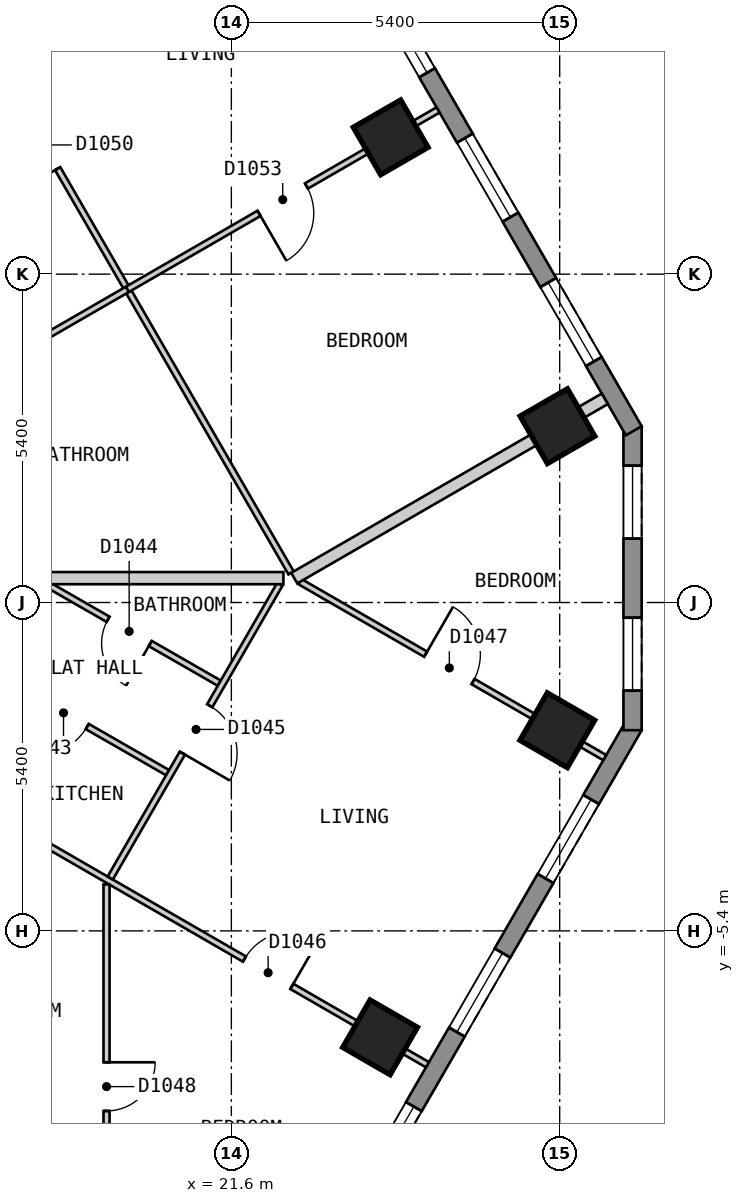
"""IFC4 building model, lengths in metres.
Left out: names, types, materials, properties, quantities, classifications, styles, units other than length and angle.
Written with IfcOpenShell. Run it as: python <this file> out.ifc"""

import sys

from ifc_helpers import new_model, si_unit, direction, frame, frame_2d, origin, origin_2d, place, context, subcontext, project, spatial, polyline, rectangle, outline, extrude, element, fill, save


model = new_model("IFC4")
c1 = context("Model", 3, precision=1e-05, world=origin(), true_north=direction((0.0, 1.0)))
c2 = subcontext(c1, "Body", "Model", "MODEL_VIEW")
j1 = project(units=[si_unit("LENGTHUNIT", "METRE"), si_unit("PLANEANGLEUNIT", "RADIAN")], contexts=[c1])
p1 = place(None, origin())
s1 = spatial("IfcSite", under=j1, at=p1, CompositionType="ELEMENT")
p2 = place(p1, origin())
s2 = spatial("IfcBuilding", under=s1, at=p2, CompositionType="ELEMENT")
p3 = place(p2, frame((0.0, 0.0, 126.6)))
s3 = spatial("IfcBuildingStorey", under=s2, at=p3, CompositionType="ELEMENT", Elevation=126.6)
for number, where, z_axis, x_axis in (
    (1, (24.046, -7.151, 0.0), (0.0, 0.0, 1.0), (0.5, 0.866, 0.0)),
    (2, (26.961, -2.101, 0.0), (0.0, 0.0, 1.0), (0.5, 0.866, 0.0)),
    (3, (26.963, 2.9, 0.0), (0.0, 0.0, 1.0), (-0.5, 0.866, 0.0)),
    (4, (24.22, 7.65, 0.0), (0.0, 0.0, 1.0), (-0.5, 0.866, 0.0)),
):
    element("IfcColumn", number, at=place(p3, frame(where, z_axis=z_axis, x_axis=x_axis)), inside=s3, PredefinedType="COLUMN", context=c2, shape_type="SweptSolid", body=[
        extrude(rectangle(XDim=0.9, YDim=0.9, at=origin_2d()), origin(), (0.0, 0.0, 1.0), 3.0),
    ])
p4 = place(p3, frame((15.862, -23.425, 0.0), z_axis=(0.0, 0.0, 1.0), x_axis=(0.500017503135, 0.866015298109, 0.0)))
e5 = element("IfcWall", 5, at=p4, inside=s3, PredefinedType="SOLIDWALL", context=c2, shape_type="SweptSolid", body=[
    extrude(outline(polyline([(0.0, -0.15), (24.711, -0.15), (24.631, 0.15), (0.08, 0.15), (0.0, -0.15)])), origin(), (0.0, 0.0, 1.0), 2.7),
])
p5 = place(p4, frame((1.4, 0.0, 0.15)))
e6 = element("IfcOpeningElement", 6, at=p5, cuts=e5, PredefinedType="OPENING", context=c2, shape_type="SweptSolid", body=[
    extrude(rectangle(XDim=1.5, YDim=2.1, at=frame_2d((0.75, 1.05))), frame((0.0, 0.16, 0.0), z_axis=(0.0, -1.0, 0.0), x_axis=(1.0, 0.0, 0.0)), (0.0, 0.0, 1.0), 0.32),
])
p6 = place(p4, frame((4.316, 0.0, 0.15)))
e7 = element("IfcOpeningElement", 7, at=p6, cuts=e5, PredefinedType="OPENING", context=c2, shape_type="SweptSolid", body=[
    extrude(rectangle(XDim=1.5, YDim=2.1, at=frame_2d((0.75, 1.05))), frame((0.0, 0.16, 0.0), z_axis=(0.0, -1.0, 0.0), x_axis=(1.0, 0.0, 0.0)), (0.0, 0.0, 1.0), 0.32),
])
p7 = place(p4, frame((7.231, 0.0, 0.15)))
e8 = element("IfcOpeningElement", 8, at=p7, cuts=e5, PredefinedType="OPENING", context=c2, shape_type="SweptSolid", body=[
    extrude(rectangle(XDim=1.5, YDim=2.1, at=frame_2d((0.75, 1.05))), frame((0.0, 0.16, 0.0), z_axis=(0.0, -1.0, 0.0), x_axis=(1.0, 0.0, 0.0)), (0.0, 0.0, 1.0), 0.32),
])
p8 = place(p4, frame((10.147, 0.0, 0.15)))
e9 = element("IfcOpeningElement", 9, at=p8, cuts=e5, PredefinedType="OPENING", context=c2, shape_type="SweptSolid", body=[
    extrude(rectangle(XDim=1.5, YDim=2.1, at=frame_2d((0.75, 1.05))), frame((0.0, 0.16, 0.0), z_axis=(0.0, -1.0, 0.0), x_axis=(1.0, 0.0, 0.0)), (0.0, 0.0, 1.0), 0.32),
])
p9 = place(p4, frame((13.062, 0.0, 0.15)))
e10 = element("IfcOpeningElement", 10, at=p9, cuts=e5, PredefinedType="OPENING", context=c2, shape_type="SweptSolid", body=[
    extrude(rectangle(XDim=1.5, YDim=2.1, at=frame_2d((0.75, 1.05))), frame((0.0, 0.16, 0.0), z_axis=(0.0, -1.0, 0.0), x_axis=(1.0, 0.0, 0.0)), (0.0, 0.0, 1.0), 0.32),
])
p10 = place(p4, frame((15.977, 0.0, 0.15)))
e11 = element("IfcOpeningElement", 11, at=p10, cuts=e5, PredefinedType="OPENING", context=c2, shape_type="SweptSolid", body=[
    extrude(rectangle(XDim=1.5, YDim=2.1, at=frame_2d((0.75, 1.05))), frame((0.0, 0.16, 0.0), z_axis=(0.0, -1.0, 0.0), x_axis=(1.0, 0.0, 0.0)), (0.0, 0.0, 1.0), 0.32),
])
p11 = place(p4, frame((18.893, 0.0, 0.15)))
e12 = element("IfcOpeningElement", 12, at=p11, cuts=e5, PredefinedType="OPENING", context=c2, shape_type="SweptSolid", body=[
    extrude(rectangle(XDim=1.5, YDim=2.1, at=frame_2d((0.75, 1.05))), frame((0.0, 0.16, 0.0), z_axis=(0.0, -1.0, 0.0), x_axis=(1.0, 0.0, 0.0)), (0.0, 0.0, 1.0), 0.32),
])
p12 = place(p4, frame((21.809, 0.0, 0.15)))
e13 = element("IfcOpeningElement", 13, at=p12, cuts=e5, PredefinedType="OPENING", context=c2, shape_type="SweptSolid", body=[
    extrude(rectangle(XDim=1.5, YDim=2.1, at=frame_2d((0.75, 1.05))), frame((0.0, 0.16, 0.0), z_axis=(0.0, -1.0, 0.0), x_axis=(1.0, 0.0, 0.0)), (0.0, 0.0, 1.0), 0.32),
])
p13 = place(p3, frame((28.198, -2.1, 0.0), z_axis=(0.0, 0.0, 1.0), x_axis=(0.0, 1.0, 0.0)))
e14 = element("IfcWall", 14, at=p13, inside=s3, PredefinedType="SOLIDWALL", context=c2, shape_type="SweptSolid", body=[
    extrude(outline(polyline([(0.0, -0.15), (5.0, -0.15), (4.92, 0.15), (0.08, 0.15), (0.0, -0.15)])), origin(), (0.0, 0.0, 1.0), 2.7),
])
p14 = place(p13, frame((0.65, 0.0, 0.15)))
e15 = element("IfcOpeningElement", 15, at=p14, cuts=e14, PredefinedType="OPENING", context=c2, shape_type="SweptSolid", body=[
    extrude(rectangle(XDim=1.2, YDim=2.1, at=frame_2d((0.6, 1.05))), frame((0.0, 0.16, 0.0), z_axis=(0.0, -1.0, 0.0), x_axis=(1.0, 0.0, 0.0)), (0.0, 0.0, 1.0), 0.32),
])
p15 = place(p13, frame((3.15, 0.0, 0.15)))
e16 = element("IfcOpeningElement", 16, at=p15, cuts=e14, PredefinedType="OPENING", context=c2, shape_type="SweptSolid", body=[
    extrude(rectangle(XDim=1.2, YDim=2.1, at=frame_2d((0.6, 1.05))), frame((0.0, 0.16, 0.0), z_axis=(0.0, -1.0, 0.0), x_axis=(1.0, 0.0, 0.0)), (0.0, 0.0, 1.0), 0.32),
])
p16 = place(p3, frame((28.218, 2.825, 0.0), z_axis=(0.0, 0.0, 1.0), x_axis=(-0.500020536353, 0.866013546791, 0.0)))
e17 = element("IfcWall", 17, at=p16, inside=s3, PredefinedType="SOLIDWALL", context=c2, shape_type="SweptSolid", body=[
    extrude(outline(polyline([(0.0, -0.15), (23.325, -0.15), (23.245, 0.15), (0.08, 0.15), (0.0, -0.15)])), origin(), (0.0, 0.0, 1.0), 2.7),
])
p17 = place(p16, frame((1.314, 0.0, 0.15)))
e18 = element("IfcOpeningElement", 18, at=p17, cuts=e17, PredefinedType="OPENING", context=c2, shape_type="SweptSolid", body=[
    extrude(rectangle(XDim=1.5, YDim=2.1, at=frame_2d((0.75, 1.05))), frame((0.0, 0.16, 0.0), z_axis=(0.0, -1.0, 0.0), x_axis=(1.0, 0.0, 0.0)), (0.0, 0.0, 1.0), 0.32),
])
p18 = place(p16, frame((4.056, 0.0, 0.15)))
e19 = element("IfcOpeningElement", 19, at=p18, cuts=e17, PredefinedType="OPENING", context=c2, shape_type="SweptSolid", body=[
    extrude(rectangle(XDim=1.5, YDim=2.1, at=frame_2d((0.75, 1.05))), frame((0.0, 0.16, 0.0), z_axis=(0.0, -1.0, 0.0), x_axis=(1.0, 0.0, 0.0)), (0.0, 0.0, 1.0), 0.32),
])
p19 = place(p16, frame((6.798, 0.0, 0.15)))
e20 = element("IfcOpeningElement", 20, at=p19, cuts=e17, PredefinedType="OPENING", context=c2, shape_type="SweptSolid", body=[
    extrude(rectangle(XDim=1.5, YDim=2.1, at=frame_2d((0.75, 1.05))), frame((0.0, 0.16, 0.0), z_axis=(0.0, -1.0, 0.0), x_axis=(1.0, 0.0, 0.0)), (0.0, 0.0, 1.0), 0.32),
])
p20 = place(p16, frame((9.541, 0.0, 0.15)))
e21 = element("IfcOpeningElement", 21, at=p20, cuts=e17, PredefinedType="OPENING", context=c2, shape_type="SweptSolid", body=[
    extrude(rectangle(XDim=1.5, YDim=2.1, at=frame_2d((0.75, 1.05))), frame((0.0, 0.16, 0.0), z_axis=(0.0, -1.0, 0.0), x_axis=(1.0, 0.0, 0.0)), (0.0, 0.0, 1.0), 0.32),
])
p21 = place(p16, frame((12.284, 0.0, 0.15)))
e22 = element("IfcOpeningElement", 22, at=p21, cuts=e17, PredefinedType="OPENING", context=c2, shape_type="SweptSolid", body=[
    extrude(rectangle(XDim=1.5, YDim=2.1, at=frame_2d((0.75, 1.05))), frame((0.0, 0.16, 0.0), z_axis=(0.0, -1.0, 0.0), x_axis=(1.0, 0.0, 0.0)), (0.0, 0.0, 1.0), 0.32),
])
p22 = place(p16, frame((15.027, 0.0, 0.15)))
e23 = element("IfcOpeningElement", 23, at=p22, cuts=e17, PredefinedType="OPENING", context=c2, shape_type="SweptSolid", body=[
    extrude(rectangle(XDim=1.5, YDim=2.1, at=frame_2d((0.75, 1.05))), frame((0.0, 0.16, 0.0), z_axis=(0.0, -1.0, 0.0), x_axis=(1.0, 0.0, 0.0)), (0.0, 0.0, 1.0), 0.32),
])
p23 = place(p16, frame((17.769, 0.0, 0.15)))
e24 = element("IfcOpeningElement", 24, at=p23, cuts=e17, PredefinedType="OPENING", context=c2, shape_type="SweptSolid", body=[
    extrude(rectangle(XDim=1.5, YDim=2.1, at=frame_2d((0.75, 1.05))), frame((0.0, 0.16, 0.0), z_axis=(0.0, -1.0, 0.0), x_axis=(1.0, 0.0, 0.0)), (0.0, 0.0, 1.0), 0.32),
])
p24 = place(p16, frame((20.511, 0.0, 0.15)))
e25 = element("IfcOpeningElement", 25, at=p24, cuts=e17, PredefinedType="OPENING", context=c2, shape_type="SweptSolid", body=[
    extrude(rectangle(XDim=1.5, YDim=2.1, at=frame_2d((0.75, 1.05))), frame((0.0, 0.16, 0.0), z_axis=(0.0, -1.0, 0.0), x_axis=(1.0, 0.0, 0.0)), (0.0, 0.0, 1.0), 0.32),
])
p25 = place(p3, frame((14.455, 14.563, 0.0), z_axis=(0.0, 0.0, 1.0), x_axis=(0.500009803579, -0.866019743612, 0.0)))
e26 = element("IfcWall", 26, at=p25, inside=s3, PredefinedType="PARTITIONING", context=c2, shape_type="SweptSolid", body=[
    extrude(rectangle(XDim=16.254, YDim=0.1, at=frame_2d((8.127, 0.0))), origin(), (0.0, 0.0, 1.0), 2.7),
])
p26 = place(p25, frame((7.677, 0.0, 0.0)))
e27 = element("IfcOpeningElement", 27, at=p26, cuts=e26, PredefinedType="OPENING", context=c2, shape_type="SweptSolid", body=[
    extrude(rectangle(XDim=0.9, YDim=2.1, at=frame_2d((0.45, 1.05))), frame((0.0, 0.06, 0.0), z_axis=(0.0, -1.0, 0.0), x_axis=(1.0, 0.0, 0.0)), (0.0, 0.0, 1.0), 0.12),
])
p27 = place(p3, frame((16.165, -2.601, 0.0), z_axis=(0.0, 0.0, 1.0), x_axis=(0.866016855193, -0.500014806302, 0.0)))
e28 = element("IfcWall", 28, at=p27, inside=s3, PredefinedType="PARTITIONING", context=c2, shape_type="SweptSolid", body=[
    extrude(rectangle(XDim=10.0, YDim=0.1, at=frame_2d((5.0, 0.0))), origin(), (0.0, 0.0, 1.0), 2.7),
])
p28 = place(p27, frame((6.524, 0.0, 0.0)))
e29 = element("IfcOpeningElement", 29, at=p28, cuts=e28, PredefinedType="OPENING", context=c2, shape_type="SweptSolid", body=[
    extrude(rectangle(XDim=0.9, YDim=2.1, at=frame_2d((0.45, 1.05))), frame((0.0, 0.06, 0.0), z_axis=(0.0, -1.0, 0.0), x_axis=(1.0, 0.0, 0.0)), (0.0, 0.0, 1.0), 0.12),
])
p29 = place(p3, frame((17.171, -0.857, 0.0), z_axis=(0.0, 0.0, 1.0), x_axis=(0.867173455867, -0.49800622229, 0.0)))
e30 = element("IfcWall", 30, at=p29, inside=s3, PredefinedType="PARTITIONING", context=c2, shape_type="SweptSolid", body=[
    extrude(rectangle(XDim=3.898, YDim=0.1, at=frame_2d((1.949, 0.0))), origin(), (0.0, 0.0, 1.0), 2.7),
])
p30 = place(p29, frame((1.474, 0.0, 0.0)))
e31 = element("IfcOpeningElement", 31, at=p30, cuts=e30, PredefinedType="OPENING", context=c2, shape_type="SweptSolid", body=[
    extrude(rectangle(XDim=0.9, YDim=2.1, at=frame_2d((0.45, 1.05))), frame((0.0, 0.06, 0.0), z_axis=(0.0, -1.0, 0.0), x_axis=(1.0, 0.0, 0.0)), (0.0, 0.0, 1.0), 0.12),
])
p31 = place(p3, frame((18.568, 0.301, 0.0), z_axis=(0.0, 0.0, 1.0), x_axis=(0.867155675456, -0.49803718187, 0.0)))
e32 = element("IfcWall", 32, at=p31, inside=s3, PredefinedType="PARTITIONING", context=c2, shape_type="SweptSolid", body=[
    extrude(rectangle(XDim=3.267, YDim=0.1, at=frame_2d((1.633, 0.0))), origin(), (0.0, 0.0, 1.0), 2.7),
])
p32 = place(p31, frame((1.158, 0.0, 0.0)))
e33 = element("IfcOpeningElement", 33, at=p32, cuts=e32, PredefinedType="OPENING", context=c2, shape_type="SweptSolid", body=[
    extrude(rectangle(XDim=0.8, YDim=2.1, at=frame_2d((0.4, 1.05))), frame((0.0, 0.06, 0.0), z_axis=(0.0, -1.0, 0.0), x_axis=(1.0, 0.0, 0.0)), (0.0, 0.0, 1.0), 0.12),
])
p33 = place(p3, frame((22.729, 0.343, 0.0), z_axis=(0.0, 0.0, 1.0), x_axis=(0.865996608848, -0.500049870977, 0.0)))
e34 = element("IfcWall", 34, at=p33, inside=s3, PredefinedType="PARTITIONING", context=c2, shape_type="SweptSolid", body=[
    extrude(rectangle(XDim=5.788, YDim=0.1, at=frame_2d((2.894, 0.0))), origin(), (0.0, 0.0, 1.0), 2.7),
])
p34 = place(p33, frame((2.386, 0.0, 0.0)))
e35 = element("IfcOpeningElement", 35, at=p34, cuts=e34, PredefinedType="OPENING", context=c2, shape_type="SweptSolid", body=[
    extrude(rectangle(XDim=0.9, YDim=2.1, at=frame_2d((0.45, 1.05))), frame((0.0, 0.06, 0.0), z_axis=(0.0, -1.0, 0.0), x_axis=(1.0, 0.0, 0.0)), (0.0, 0.0, 1.0), 0.12),
])
p35 = place(p3, frame((19.608, -4.531, 0.0), z_axis=(0.0, 0.0, 1.0), x_axis=(0.500035555316, 0.86600487494, 0.0)))
e36 = element("IfcWall", 36, at=p35, inside=s3, PredefinedType="PARTITIONING", context=c2, shape_type="SweptSolid", body=[
    extrude(rectangle(XDim=5.58, YDim=0.1, at=frame_2d((2.79, 0.0))), origin(), (0.0, 0.0, 1.0), 2.7),
])
p36 = place(p35, frame((2.372, 0.0, 0.0)))
e37 = element("IfcOpeningElement", 37, at=p36, cuts=e36, PredefinedType="OPENING", context=c2, shape_type="SweptSolid", body=[
    extrude(rectangle(XDim=0.9, YDim=2.1, at=frame_2d((0.45, 1.05))), frame((0.0, 0.06, 0.0), z_axis=(0.0, -1.0, 0.0), x_axis=(1.0, 0.0, 0.0)), (0.0, 0.0, 1.0), 0.12),
])
p37 = place(p3, frame((19.547, -11.171, 0.0), z_axis=(0.0, 0.0, 1.0), x_axis=(0.0, 1.0, 0.0)))
e38 = element("IfcWall", 38, at=p37, inside=s3, PredefinedType="PARTITIONING", context=c2, shape_type="SweptSolid", body=[
    extrude(rectangle(XDim=6.534, YDim=0.1, at=frame_2d((3.267, 0.0))), origin(), (0.0, 0.0, 1.0), 2.7),
])
p38 = place(p37, frame((2.81, 0.0, 0.0)))
e39 = element("IfcOpeningElement", 39, at=p38, cuts=e38, PredefinedType="OPENING", context=c2, shape_type="SweptSolid", body=[
    extrude(rectangle(XDim=0.8, YDim=2.1, at=frame_2d((0.4, 1.05))), frame((0.0, 0.06, 0.0), z_axis=(0.0, -1.0, 0.0), x_axis=(1.0, 0.0, 0.0)), (0.0, 0.0, 1.0), 0.12),
])
p39 = place(p3, frame((16.339, 3.1, 0.0), z_axis=(0.0, 0.0, 1.0), x_axis=(0.866050731258, 0.499956128963, 0.0)))
e40 = element("IfcWall", 40, at=p39, inside=s3, PredefinedType="PARTITIONING", context=c2, shape_type="SweptSolid", body=[
    extrude(rectangle(XDim=4.1, YDim=0.1, at=frame_2d((2.05, 0.0))), origin(), (0.0, 0.0, 1.0), 2.7),
])
p40 = place(p39, frame((1.6, 0.0, 0.0)))
e41 = element("IfcOpeningElement", 41, at=p40, cuts=e40, PredefinedType="OPENING", context=c2, shape_type="SweptSolid", body=[
    extrude(rectangle(XDim=0.8, YDim=2.1, at=frame_2d((0.4, 1.05))), frame((0.0, 0.06, 0.0), z_axis=(0.0, -1.0, 0.0), x_axis=(1.0, 0.0, 0.0)), (0.0, 0.0, 1.0), 0.12),
])
p41 = place(p3, frame((17.782, 0.401, 0.0), z_axis=(0.0, 0.0, 1.0), x_axis=(1.0, 0.0, 0.0)))
e42 = element("IfcWall", 42, at=p41, inside=s3, PredefinedType="PARTITIONING", context=c2, shape_type="SweptSolid", body=[
    extrude(rectangle(XDim=4.674, YDim=0.2, at=frame_2d((2.337, 0.0))), origin(), (0.0, 0.0, 1.0), 2.7),
])
p42 = place(p3, frame((22.634, 0.401, 0.0), z_axis=(0.0, 0.0, 1.0), x_axis=(0.86601325737, 0.500021037617, 0.0)))
e43 = element("IfcWall", 43, at=p42, inside=s3, PredefinedType="PARTITIONING", context=c2, shape_type="SweptSolid", body=[
    extrude(rectangle(XDim=5.898, YDim=0.2, at=frame_2d((2.949, 0.0))), origin(), (0.0, 0.0, 1.0), 2.7),
])
p43 = place(p3, frame((19.89, 5.15, 0.0), z_axis=(0.0, 0.0, 1.0), x_axis=(0.865993310977, 0.500055582255, 0.0)))
e44 = element("IfcWall", 44, at=p43, inside=s3, PredefinedType="PARTITIONING", context=c2, shape_type="SweptSolid", body=[
    extrude(rectangle(XDim=5.9, YDim=0.1, at=frame_2d((2.95, 0.0))), origin(), (0.0, 0.0, 1.0), 2.7),
])
p44 = place(p43, frame((2.5, 0.0, 0.0)))
e45 = element("IfcOpeningElement", 45, at=p44, cuts=e44, PredefinedType="OPENING", context=c2, shape_type="SweptSolid", body=[
    extrude(rectangle(XDim=0.9, YDim=2.1, at=frame_2d((0.45, 1.05))), frame((0.0, 0.06, 0.0), z_axis=(0.0, -1.0, 0.0), x_axis=(1.0, 0.0, 0.0)), (0.0, 0.0, 1.0), 0.12),
])
p45 = place(p10, origin())
e46 = element("IfcWindow", 46, at=p45, inside=s3, PartitioningType="SINGLE_PANEL", PredefinedType="WINDOW", context=c2, shape_type="SweptSolid", body=[
    extrude(rectangle(XDim=1.5, YDim=2.1, at=frame_2d((0.75, 1.05))), frame((0.0, 0.03, 0.0), z_axis=(0.0, -1.0, 0.0), x_axis=(1.0, 0.0, 0.0)), (0.0, 0.0, 1.0), 0.06),
])
fill(e11, e46)
p46 = place(p11, origin())
e47 = element("IfcWindow", 47, at=p46, inside=s3, PartitioningType="SINGLE_PANEL", PredefinedType="WINDOW", context=c2, shape_type="SweptSolid", body=[
    extrude(rectangle(XDim=1.5, YDim=2.1, at=frame_2d((0.75, 1.05))), frame((0.0, 0.03, 0.0), z_axis=(0.0, -1.0, 0.0), x_axis=(1.0, 0.0, 0.0)), (0.0, 0.0, 1.0), 0.06),
])
fill(e12, e47)
p47 = place(p12, origin())
e48 = element("IfcWindow", 48, at=p47, inside=s3, PartitioningType="SINGLE_PANEL", PredefinedType="WINDOW", context=c2, shape_type="SweptSolid", body=[
    extrude(rectangle(XDim=1.5, YDim=2.1, at=frame_2d((0.75, 1.05))), frame((0.0, 0.03, 0.0), z_axis=(0.0, -1.0, 0.0), x_axis=(1.0, 0.0, 0.0)), (0.0, 0.0, 1.0), 0.06),
])
fill(e13, e48)
p48 = place(p14, origin())
e49 = element("IfcWindow", 49, at=p48, inside=s3, PartitioningType="SINGLE_PANEL", PredefinedType="WINDOW", context=c2, shape_type="SweptSolid", body=[
    extrude(rectangle(XDim=1.2, YDim=2.1, at=frame_2d((0.6, 1.05))), frame((0.0, 0.03, 0.0), z_axis=(0.0, -1.0, 0.0), x_axis=(1.0, 0.0, 0.0)), (0.0, 0.0, 1.0), 0.06),
])
fill(e15, e49)
p49 = place(p15, origin())
e50 = element("IfcWindow", 50, at=p49, inside=s3, PartitioningType="SINGLE_PANEL", PredefinedType="WINDOW", context=c2, shape_type="SweptSolid", body=[
    extrude(rectangle(XDim=1.2, YDim=2.1, at=frame_2d((0.6, 1.05))), frame((0.0, 0.03, 0.0), z_axis=(0.0, -1.0, 0.0), x_axis=(1.0, 0.0, 0.0)), (0.0, 0.0, 1.0), 0.06),
])
fill(e16, e50)
p50 = place(p17, origin())
e51 = element("IfcWindow", 51, at=p50, inside=s3, PartitioningType="SINGLE_PANEL", PredefinedType="WINDOW", context=c2, shape_type="SweptSolid", body=[
    extrude(rectangle(XDim=1.5, YDim=2.1, at=frame_2d((0.75, 1.05))), frame((0.0, 0.03, 0.0), z_axis=(0.0, -1.0, 0.0), x_axis=(1.0, 0.0, 0.0)), (0.0, 0.0, 1.0), 0.06),
])
fill(e18, e51)
p51 = place(p18, origin())
e52 = element("IfcWindow", 52, at=p51, inside=s3, PartitioningType="SINGLE_PANEL", PredefinedType="WINDOW", context=c2, shape_type="SweptSolid", body=[
    extrude(rectangle(XDim=1.5, YDim=2.1, at=frame_2d((0.75, 1.05))), frame((0.0, 0.03, 0.0), z_axis=(0.0, -1.0, 0.0), x_axis=(1.0, 0.0, 0.0)), (0.0, 0.0, 1.0), 0.06),
])
fill(e19, e52)
p52 = place(p19, origin())
e53 = element("IfcWindow", 53, at=p52, inside=s3, PartitioningType="SINGLE_PANEL", PredefinedType="WINDOW", context=c2, shape_type="SweptSolid", body=[
    extrude(rectangle(XDim=1.5, YDim=2.1, at=frame_2d((0.75, 1.05))), frame((0.0, 0.03, 0.0), z_axis=(0.0, -1.0, 0.0), x_axis=(1.0, 0.0, 0.0)), (0.0, 0.0, 1.0), 0.06),
])
fill(e20, e53)
p53 = place(p30, origin())
e54 = element("IfcDoor", 54, at=p53, inside=s3, OperationType="SINGLE_SWING_LEFT", PredefinedType="DOOR", context=c2, shape_type="SweptSolid", body=[
    extrude(rectangle(XDim=0.9, YDim=2.1, at=frame_2d((0.45, 1.05))), frame((0.0, 0.025, 0.0), z_axis=(0.0, -1.0, 0.0), x_axis=(1.0, 0.0, 0.0)), (0.0, 0.0, 1.0), 0.05),
])
fill(e31, e54)
p54 = place(p32, origin())
e55 = element("IfcDoor", 55, at=p54, inside=s3, OperationType="SINGLE_SWING_RIGHT", PredefinedType="DOOR", context=c2, shape_type="SweptSolid", body=[
    extrude(rectangle(XDim=0.8, YDim=2.1, at=frame_2d((0.4, 1.05))), frame((0.0, 0.025, 0.0), z_axis=(0.0, -1.0, 0.0), x_axis=(1.0, 0.0, 0.0)), (0.0, 0.0, 1.0), 0.05),
])
fill(e33, e55)
p55 = place(p36, origin())
e56 = element("IfcDoor", 56, at=p55, inside=s3, OperationType="SINGLE_SWING_LEFT", PredefinedType="DOOR", context=c2, shape_type="SweptSolid", body=[
    extrude(rectangle(XDim=0.9, YDim=2.1, at=frame_2d((0.45, 1.05))), frame((0.0, 0.025, 0.0), z_axis=(0.0, -1.0, 0.0), x_axis=(1.0, 0.0, 0.0)), (0.0, 0.0, 1.0), 0.05),
])
fill(e37, e56)
p56 = place(p28, origin())
e57 = element("IfcDoor", 57, at=p56, inside=s3, OperationType="SINGLE_SWING_RIGHT", PredefinedType="DOOR", context=c2, shape_type="SweptSolid", body=[
    extrude(rectangle(XDim=0.9, YDim=2.1, at=frame_2d((0.45, 1.05))), frame((0.0, 0.025, 0.0), z_axis=(0.0, -1.0, 0.0), x_axis=(1.0, 0.0, 0.0)), (0.0, 0.0, 1.0), 0.05),
])
fill(e29, e57)
p57 = place(p34, origin())
e58 = element("IfcDoor", 58, at=p57, inside=s3, OperationType="SINGLE_SWING_LEFT", PredefinedType="DOOR", context=c2, shape_type="SweptSolid", body=[
    extrude(rectangle(XDim=0.9, YDim=2.1, at=frame_2d((0.45, 1.05))), frame((0.0, 0.025, 0.0), z_axis=(0.0, -1.0, 0.0), x_axis=(1.0, 0.0, 0.0)), (0.0, 0.0, 1.0), 0.05),
])
fill(e35, e58)
p58 = place(p38, origin())
e59 = element("IfcDoor", 59, at=p58, inside=s3, OperationType="SINGLE_SWING_RIGHT", PredefinedType="DOOR", context=c2, shape_type="SweptSolid", body=[
    extrude(rectangle(XDim=0.8, YDim=2.1, at=frame_2d((0.4, 1.05))), frame((0.0, 0.025, 0.0), z_axis=(0.0, -1.0, 0.0), x_axis=(1.0, 0.0, 0.0)), (0.0, 0.0, 1.0), 0.05),
])
fill(e39, e59)
p59 = place(p26, origin())
e60 = element("IfcDoor", 60, at=p59, inside=s3, OperationType="SINGLE_SWING_RIGHT", PredefinedType="DOOR", context=c2, shape_type="SweptSolid", body=[
    extrude(rectangle(XDim=0.9, YDim=2.1, at=frame_2d((0.45, 1.05))), frame((0.0, 0.025, 0.0), z_axis=(0.0, -1.0, 0.0), x_axis=(1.0, 0.0, 0.0)), (0.0, 0.0, 1.0), 0.05),
])
fill(e27, e60)
p60 = place(p44, origin())
e61 = element("IfcDoor", 61, at=p60, inside=s3, OperationType="SINGLE_SWING_LEFT", PredefinedType="DOOR", context=c2, shape_type="SweptSolid", body=[
    extrude(rectangle(XDim=0.9, YDim=2.1, at=frame_2d((0.45, 1.05))), frame((0.0, 0.025, 0.0), z_axis=(0.0, -1.0, 0.0), x_axis=(1.0, 0.0, 0.0)), (0.0, 0.0, 1.0), 0.05),
])
fill(e45, e61)
save(model, sys.argv[1])
